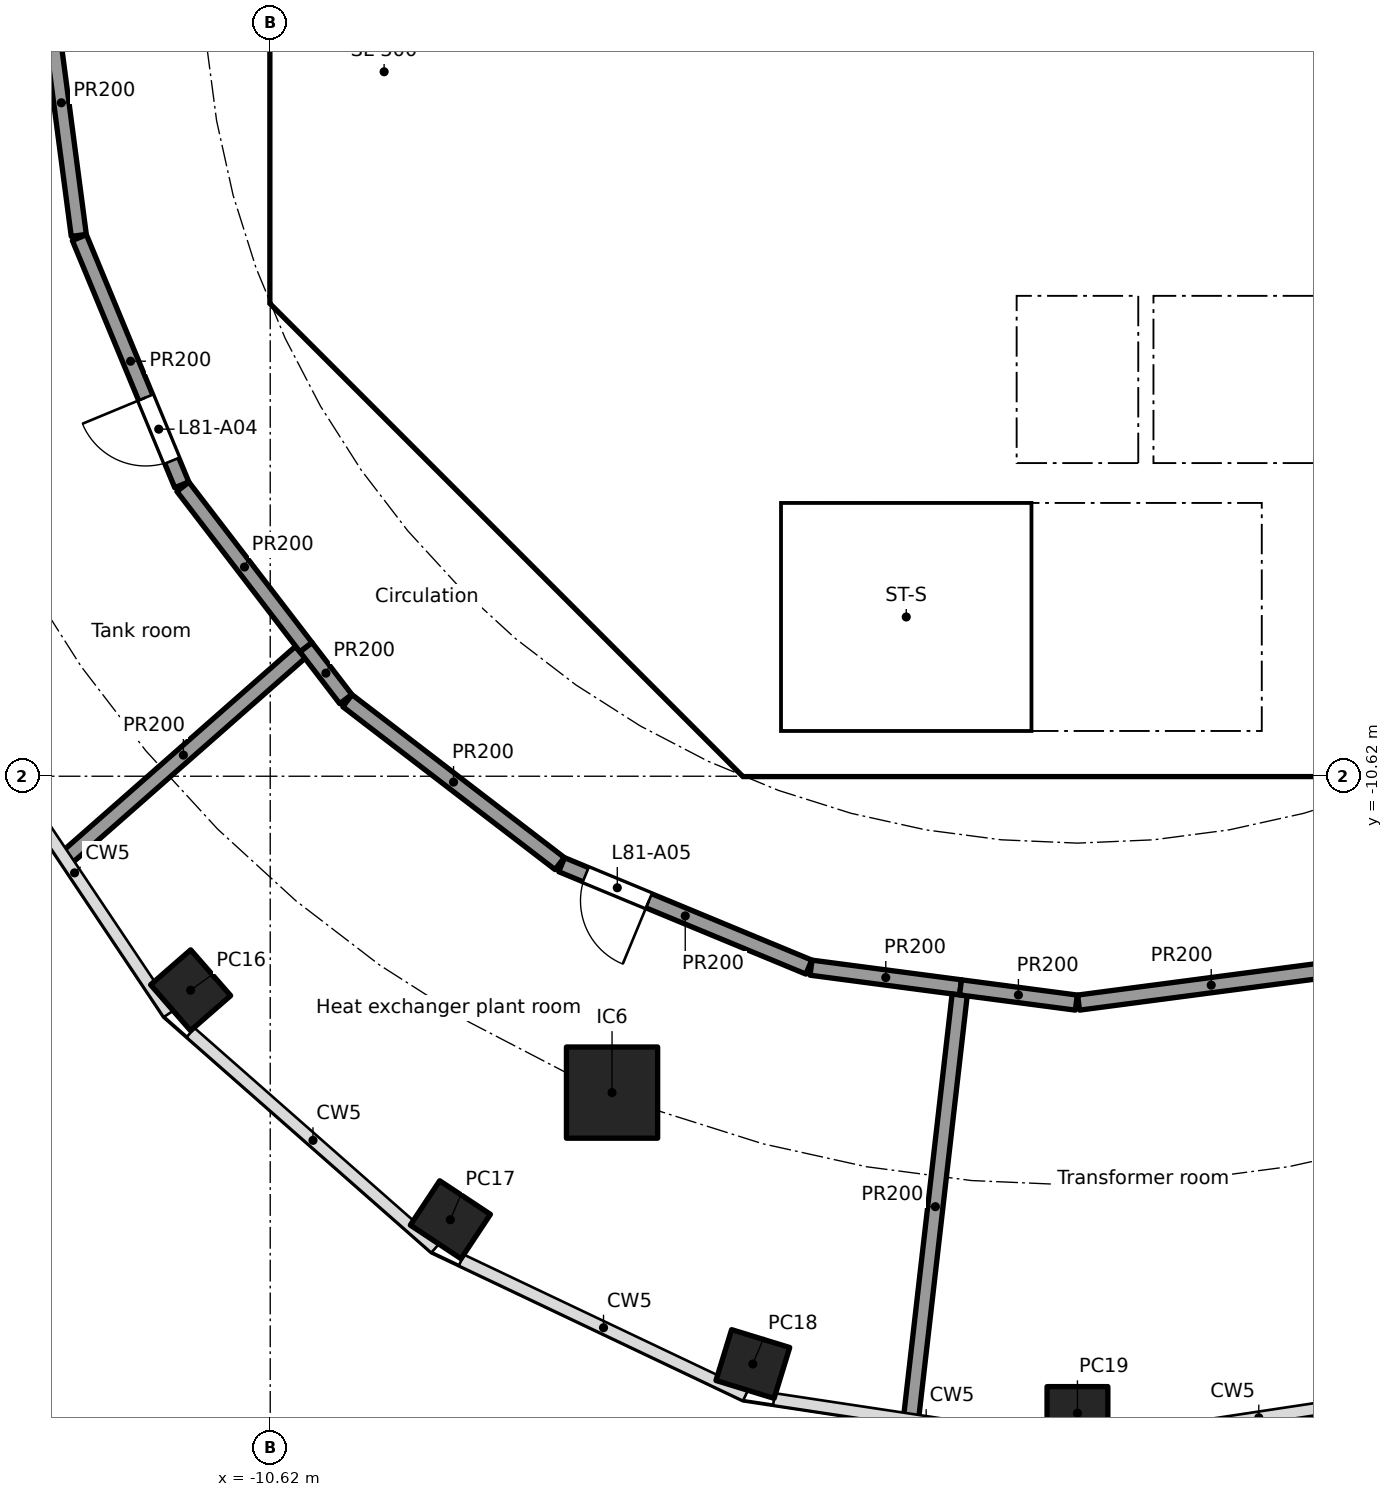
"""IFC4 building model, lengths in metres.
Left out: names, types, materials, properties, quantities, classifications, styles, units other than length and angle.
Written with IfcOpenShell. Run it as: python <this file> out.ifc"""

import sys

from ifc_helpers import new_model, si_unit, direction, frame, frame_2d, origin, origin_2d, place, context, subcontext, project, spatial, polyline, rectangle, hollow_rectangle, outline, extrude, element, fill, save


model = new_model("IFC4")
c1 = context("Model", 3, precision=1e-05, world=origin(), true_north=direction((0.0, 1.0)))
c2 = subcontext(c1, "Body", "Model", "MODEL_VIEW")
j1 = project(units=[si_unit("LENGTHUNIT", "METRE"), si_unit("PLANEANGLEUNIT", "RADIAN")], contexts=[c1])
p1 = place(None, origin())
s1 = spatial("IfcSite", under=j1, at=p1, CompositionType="ELEMENT")
p2 = place(p1, origin())
s2 = spatial("IfcBuilding", under=s1, at=p2, CompositionType="ELEMENT")
p3 = place(p2, frame((0.0, 0.0, 328.9)))
s3 = spatial("IfcBuildingStorey", under=s2, at=p3, CompositionType="ELEMENT", Elevation=328.9)
for number, where, z_axis, x_axis in (
    (1, (-11.667, -13.435, 0.0), (0.0, 0.0, 1.0), (0.657, -0.754, 0.0)),
    (2, (-8.25, -16.455, 0.0), (0.0, 0.0, 1.0), (0.834, -0.552, 0.0)),
    (3, (-4.271, -18.353, 0.0), (0.0, 0.0, 1.0), (0.956, -0.294, 0.0)),
    (4, (0.0, -19.0, 0.0), (0.0, 0.0, 1.0), (1.0, 0.0, 0.0)),
):
    element("IfcColumn", number, at=place(p3, frame(where, z_axis=z_axis, x_axis=x_axis)), inside=s3, PredefinedType="COLUMN", context=c2, shape_type="SweptSolid", body=[
        extrude(hollow_rectangle(XDim=0.8, YDim=0.7, WallThickness=0.025, at=origin_2d()), origin(), (0.0, 0.0, 1.0), 4.0),
    ])
p4 = place(p3, frame((-6.123, -14.782, 0.0), z_axis=(0.0, 0.0, 1.0), x_axis=(1.0, 0.0, 0.0)))
e5 = element("IfcColumn", 5, at=p4, inside=s3, PredefinedType="COLUMN", context=c2, shape_type="SweptSolid", body=[
    extrude(rectangle(XDim=1.2, YDim=1.2, at=origin_2d()), origin(), (0.0, 0.0, 1.0), 4.0),
])
p5 = place(p3, frame((-10.325, 3.801, 0.0), z_axis=(0.0, 0.0, 1.0), x_axis=(0.0, -1.0, 0.0)))
e6 = element("IfcWall", 6, at=p5, inside=s3, PredefinedType="SHEAR", context=c2, shape_type="SweptSolid", body=[
    extrude(rectangle(XDim=7.602, YDim=0.6, at=frame_2d((3.801, 0.0))), origin(), (0.0, 0.0, 1.0), 3.7),
])
p6 = place(p5, frame((0.651, 0.0, 0.0)))
e7 = element("IfcOpeningElement", 7, at=p6, cuts=e6, PredefinedType="OPENING", context=c2, shape_type="SweptSolid", body=[
    extrude(rectangle(XDim=1.5, YDim=2.1, at=frame_2d((0.75, 1.05))), frame((0.0, 0.31, 0.0), z_axis=(0.0, -1.0, 0.0), x_axis=(1.0, 0.0, 0.0)), (0.0, 0.0, 1.0), 0.62),
])
p7 = place(p5, frame((5.451, 0.0, 0.0)))
e8 = element("IfcOpeningElement", 8, at=p7, cuts=e6, PredefinedType="OPENING", context=c2, shape_type="SweptSolid", body=[
    extrude(rectangle(XDim=1.5, YDim=2.1, at=frame_2d((0.75, 1.05))), frame((0.0, 0.31, 0.0), z_axis=(0.0, -1.0, 0.0), x_axis=(1.0, 0.0, 0.0)), (0.0, 0.0, 1.0), 0.62),
])
p8 = place(p3, frame((-9.988, -4.613, 0.0), z_axis=(0.0, 0.0, 1.0), x_axis=(0.707106781187, -0.707106781187, 0.0)))
e9 = element("IfcWall", 9, at=p8, inside=s3, PredefinedType="SHEAR", context=c2, shape_type="SweptSolid", body=[
    extrude(rectangle(XDim=7.602, YDim=0.6, at=frame_2d((3.801, 0.0))), origin(), (0.0, 0.0, 1.0), 3.7),
])
p9 = place(p8, frame((6.151, 0.0, 0.0)))
e10 = element("IfcOpeningElement", 10, at=p9, cuts=e9, PredefinedType="OPENING", context=c2, shape_type="SweptSolid", body=[
    extrude(rectangle(XDim=1.1, YDim=2.1, at=frame_2d((0.55, 1.05))), frame((0.0, 0.31, 0.0), z_axis=(0.0, -1.0, 0.0), x_axis=(1.0, 0.0, 0.0)), (0.0, 0.0, 1.0), 0.62),
])
p10 = place(p3, frame((-5.8, -8.227, 0.0), z_axis=(0.0, 0.0, 1.0), x_axis=(0.0, 1.0, 0.0)))
e11 = element("IfcWall", 11, at=p10, inside=s3, PredefinedType="PARTITIONING", context=c2, shape_type="SweptSolid", body=[
    extrude(rectangle(XDim=3.927, YDim=0.15, at=frame_2d((1.963, 0.0))), origin(), (0.0, 0.0, 1.0), 3.7),
])
p11 = place(p10, frame((2.764, 0.0, 0.0)))
e12 = element("IfcOpeningElement", 12, at=p11, cuts=e11, PredefinedType="OPENING", context=c2, shape_type="SweptSolid", body=[
    extrude(rectangle(XDim=0.9, YDim=2.1, at=frame_2d((0.45, 1.05))), frame((0.0, 0.085, 0.0), z_axis=(0.0, -1.0, 0.0), x_axis=(1.0, 0.0, 0.0)), (0.0, 0.0, 1.0), 0.17),
])
p12 = place(p10, frame((0.688, 0.0, 0.0)))
e13 = element("IfcOpeningElement", 13, at=p12, cuts=e11, PredefinedType="OPENING", context=c2, shape_type="SweptSolid", body=[
    extrude(rectangle(XDim=0.9, YDim=2.1, at=frame_2d((0.45, 1.05))), frame((0.0, 0.085, 0.0), z_axis=(0.0, -1.0, 0.0), x_axis=(1.0, 0.0, 0.0)), (0.0, 0.0, 1.0), 0.17),
])
p13 = place(p3, frame((-4.0, -6.5, 0.0), z_axis=(0.0, 0.0, 1.0), x_axis=(0.0, 1.0, 0.0)))
e14 = element("IfcWall", 14, at=p13, inside=s3, PredefinedType="SOLIDWALL", context=c2, shape_type="SweptSolid", body=[
    extrude(rectangle(XDim=2.2, YDim=0.2, at=frame_2d((1.1, 0.0))), origin(), (0.0, 0.0, 1.0), 3.7),
])
p14 = place(p13, frame((0.65, 0.0, 0.0)))
e15 = element("IfcOpeningElement", 15, at=p14, cuts=e14, PredefinedType="OPENING", context=c2, shape_type="SweptSolid", body=[
    extrude(rectangle(XDim=0.9, YDim=2.1, at=frame_2d((0.45, 1.05))), frame((0.0, 0.11, 0.0), z_axis=(0.0, -1.0, 0.0), x_axis=(1.0, 0.0, 0.0)), (0.0, 0.0, 1.0), 0.22),
])
p15 = place(p3, frame((-6.7, -2.0, 0.0), z_axis=(0.0, 0.0, 1.0), x_axis=(1.0, 0.0, 0.0)))
e16 = element("IfcWall", 16, at=p15, inside=s3, PredefinedType="SOLIDWALL", context=c2, shape_type="SweptSolid", body=[
    extrude(rectangle(XDim=13.4, YDim=0.2, at=frame_2d((6.7, 0.0))), origin(), (0.0, 0.0, 1.0), 3.7),
])
p16 = place(p15, frame((1.85, 0.0, 0.0)))
e17 = element("IfcOpeningElement", 17, at=p16, cuts=e16, PredefinedType="OPENING", context=c2, shape_type="SweptSolid", body=[
    extrude(rectangle(XDim=0.9, YDim=2.1, at=frame_2d((0.45, 1.05))), frame((0.0, 0.11, 0.0), z_axis=(0.0, -1.0, 0.0), x_axis=(1.0, 0.0, 0.0)), (0.0, 0.0, 1.0), 0.22),
])
p17 = place(p15, frame((5.15, 0.0, 0.0)))
e18 = element("IfcOpeningElement", 18, at=p17, cuts=e16, PredefinedType="OPENING", context=c2, shape_type="SweptSolid", body=[
    extrude(rectangle(XDim=0.9, YDim=2.1, at=frame_2d((0.45, 1.05))), frame((0.0, 0.11, 0.0), z_axis=(0.0, -1.0, 0.0), x_axis=(1.0, 0.0, 0.0)), (0.0, 0.0, 1.0), 0.22),
])
p18 = place(p15, frame((7.35, 0.0, 0.0)))
e19 = element("IfcOpeningElement", 19, at=p18, cuts=e16, PredefinedType="OPENING", context=c2, shape_type="SweptSolid", body=[
    extrude(rectangle(XDim=0.9, YDim=2.1, at=frame_2d((0.45, 1.05))), frame((0.0, 0.11, 0.0), z_axis=(0.0, -1.0, 0.0), x_axis=(1.0, 0.0, 0.0)), (0.0, 0.0, 1.0), 0.22),
])
p19 = place(p15, frame((10.65, 0.0, 0.0)))
e20 = element("IfcOpeningElement", 20, at=p19, cuts=e16, PredefinedType="OPENING", context=c2, shape_type="SweptSolid", body=[
    extrude(rectangle(XDim=0.9, YDim=2.1, at=frame_2d((0.45, 1.05))), frame((0.0, 0.11, 0.0), z_axis=(0.0, -1.0, 0.0), x_axis=(1.0, 0.0, 0.0)), (0.0, 0.0, 1.0), 0.22),
])
p20 = place(p3, origin())
e21 = element("IfcWall", 21, at=p20, inside=s3, PredefinedType="SHEAR", context=c2, shape_type="SweptSolid", body=[
    extrude(outline(polyline([(-10.625, -3.801), (-10.025, -3.801), (-10.025, -4.152), (-9.776, -4.401), (-10.2, -4.825), (-10.625, -4.401), (-10.625, -3.801)])), origin(), (0.0, 0.0, 1.0), 3.7),
])
p21 = place(p3, origin())
e22 = element("IfcWall", 22, at=p21, inside=s3, PredefinedType="SHEAR", context=c2, shape_type="SweptSolid", body=[
    extrude(outline(polyline([(-4.152, -10.025), (4.152, -10.025), (4.401, -9.776), (4.825, -10.2), (4.401, -10.625), (-4.401, -10.625), (-4.825, -10.2), (-4.401, -9.776), (-4.152, -10.025)])), origin(), (0.0, 0.0, 1.0), 3.7),
])
p22 = place(p3, frame((-10.025, -4.0, 0.0), z_axis=(0.0, 0.0, 1.0), x_axis=(1.0, 0.0, 0.0)))
e23 = element("IfcWall", 23, at=p22, inside=s3, PredefinedType="PARTITIONING", context=c2, shape_type="SweptSolid", body=[
    extrude(rectangle(XDim=3.325, YDim=0.2, at=frame_2d((1.662, 0.0))), origin(), (0.0, 0.0, 1.0), 3.7),
])
p23 = place(p3, frame((-8.301, -5.8, 0.0), z_axis=(0.0, 0.0, 1.0), x_axis=(1.0, 0.0, 0.0)))
e24 = element("IfcWall", 24, at=p23, inside=s3, PredefinedType="PARTITIONING", context=c2, shape_type="SweptSolid", body=[
    extrude(rectangle(XDim=2.426, YDim=0.15, at=frame_2d((1.213, 0.0))), origin(), (0.0, 0.0, 1.0), 3.7),
])
for number, where, z_axis, x_axis in (
    (25, (-0.9, -6.5, 0.0), (0.0, 0.0, 1.0), (0.0, 1.0, 0.0)),
    (26, (0.9, -6.5, 0.0), (0.0, 0.0, 1.0), (0.0, 1.0, 0.0)),
):
    element("IfcWall", number, at=place(p3, frame(where, z_axis=z_axis, x_axis=x_axis)), inside=s3, PredefinedType="SOLIDWALL", context=c2, shape_type="SweptSolid", body=[
        extrude(rectangle(XDim=2.2, YDim=0.2, at=frame_2d((1.1, 0.0))), origin(), (0.0, 0.0, 1.0), 3.7),
    ])
p24 = place(p3, origin())
e27 = element("IfcWall", 27, at=p24, inside=s3, PredefinedType="SOLIDWALL", context=c2, shape_type="SweptSolid", body=[
    extrude(outline(polyline([(-6.7, -2.1), (-6.5, -2.1), (-6.5, -4.1), (-2.3, -4.1), (-2.3, -2.1), (-2.1, -2.1), (-2.1, -4.1), (-0.1, -4.1), (-0.1, -2.1), (0.1, -2.1), (0.1, -4.1), (2.1, -4.1), (2.1, -2.1), (2.3, -2.1), (2.3, -4.1), (6.5, -4.1), (6.5, -2.1), (6.7, -2.1), (6.7, -4.3), (-6.7, -4.3), (-6.7, -2.1)])), origin(), (0.0, 0.0, 1.0), 3.7),
])
p25 = place(p3, origin())
e28 = element("IfcWall", 28, at=p25, inside=s3, PredefinedType="SOLIDWALL", context=c2, shape_type="SweptSolid", body=[
    extrude(outline(polyline([(-3.9, -10.025), (-4.1, -10.025), (-4.1, -7.025), (-3.9, -7.025), (-3.9, -10.025)])), origin(), (0.0, 0.0, 1.0), 3.7),
])
p26 = place(p3, origin())
e29 = element("IfcWall", 29, at=p26, inside=s3, PredefinedType="SOLIDWALL", context=c2, shape_type="SweptSolid", body=[
    extrude(outline(polyline([(4.1, -7.025), (-4.1, -7.025), (-4.1, -6.5), (4.1, -6.5), (4.1, -7.025)])), origin(), (0.0, 0.0, 1.0), 3.7),
])
p27 = place(p3, frame((-13.139, -3.505, 0.0), z_axis=(0.0, 0.0, 1.0), x_axis=(-0.130468866457, 0.991452406768, 0.0)))
e30 = element("IfcWall", 30, at=p27, inside=s3, PredefinedType="PARTITIONING", context=c2, shape_type="SweptSolid", body=[
    extrude(rectangle(XDim=3.52, YDim=0.2, at=frame_2d((1.76, 0.0))), origin(), (0.0, 0.0, 1.0), 3.7),
])
p28 = place(p3, frame((-11.784, -6.786, 0.0), z_axis=(0.0, 0.0, 1.0), x_axis=(-0.382723413813, 0.92386297064, 0.0)))
e31 = element("IfcWall", 31, at=p28, inside=s3, PredefinedType="PARTITIONING", context=c2, shape_type="SweptSolid", body=[
    extrude(rectangle(XDim=3.52, YDim=0.2, at=frame_2d((1.76, 0.0))), origin(), (0.0, 0.0, 1.0), 3.7),
])
p29 = place(p28, frame((0.342, 0.0, 0.0)))
e32 = element("IfcOpeningElement", 32, at=p29, cuts=e31, PredefinedType="OPENING", context=c2, shape_type="SweptSolid", body=[
    extrude(rectangle(XDim=0.9, YDim=2.1, at=frame_2d((0.45, 1.05))), frame((0.0, 0.11, 0.0), z_axis=(0.0, -1.0, 0.0), x_axis=(1.0, 0.0, 0.0)), (0.0, 0.0, 1.0), 0.22),
])
p30 = place(p3, frame((-10.224, -8.989, 0.0), z_axis=(0.0, 0.0, 1.0), x_axis=(-0.750994766266, -0.660308156122, 0.0)))
e33 = element("IfcWall", 33, at=p30, inside=s3, PredefinedType="PARTITIONING", context=c2, shape_type="SweptSolid", body=[
    extrude(rectangle(XDim=4.097, YDim=0.2, at=frame_2d((2.049, 0.0))), origin(), (0.0, 0.0, 1.0), 3.7),
])
p31 = place(p3, frame((-10.149, -8.923, 0.0), z_axis=(0.0, 0.0, 1.0), x_axis=(-0.608699260048, 0.793401040343, 0.0)))
e34 = element("IfcWall", 34, at=p31, inside=s3, PredefinedType="PARTITIONING", context=c2, shape_type="SweptSolid", body=[
    extrude(rectangle(XDim=2.661, YDim=0.2, at=frame_2d((1.331, 0.0))), origin(), (0.0, 0.0, 1.0), 3.7),
])
p32 = place(p3, frame((-9.626, -9.605, 0.0), z_axis=(0.0, 0.0, 1.0), x_axis=(-0.608694005511, 0.793405071609, 0.0)))
e35 = element("IfcWall", 35, at=p32, inside=s3, PredefinedType="PARTITIONING", context=c2, shape_type="SweptSolid", body=[
    extrude(rectangle(XDim=0.859, YDim=0.2, at=frame_2d((0.43, 0.0))), origin(), (0.0, 0.0, 1.0), 3.7),
])
p33 = place(p3, frame((-6.812, -11.769, 0.0), z_axis=(0.0, 0.0, 1.0), x_axis=(-0.793402024283, 0.608697977542, 0.0)))
e36 = element("IfcWall", 36, at=p33, inside=s3, PredefinedType="PARTITIONING", context=c2, shape_type="SweptSolid", body=[
    extrude(rectangle(XDim=3.52, YDim=0.2, at=frame_2d((1.76, 0.0))), origin(), (0.0, 0.0, 1.0), 3.7),
])
p34 = place(p3, frame((-3.534, -13.131, 0.0), z_axis=(0.0, 0.0, 1.0), x_axis=(-0.92386297064, 0.382723413813, 0.0)))
e37 = element("IfcWall", 37, at=p34, inside=s3, PredefinedType="PARTITIONING", context=c2, shape_type="SweptSolid", body=[
    extrude(rectangle(XDim=3.52, YDim=0.2, at=frame_2d((1.76, 0.0))), origin(), (0.0, 0.0, 1.0), 3.7),
])
p35 = place(p34, frame((2.278, 0.0, 0.0)))
e38 = element("IfcOpeningElement", 38, at=p35, cuts=e37, PredefinedType="OPENING", context=c2, shape_type="SweptSolid", body=[
    extrude(rectangle(XDim=0.9, YDim=2.1, at=frame_2d((0.45, 1.05))), frame((0.0, 0.11, 0.0), z_axis=(0.0, -1.0, 0.0), x_axis=(1.0, 0.0, 0.0)), (0.0, 0.0, 1.0), 0.22),
])
p36 = place(p3, frame((-1.538, -13.397, 0.0), z_axis=(0.0, 0.0, 1.0), x_axis=(-0.991454295543, 0.130454512571, 0.0)))
e39 = element("IfcWall", 39, at=p36, inside=s3, PredefinedType="PARTITIONING", context=c2, shape_type="SweptSolid", body=[
    extrude(rectangle(XDim=1.984, YDim=0.2, at=frame_2d((0.992, 0.0))), origin(), (0.0, 0.0, 1.0), 3.7),
])
p37 = place(p3, frame((-1.55, -13.497, 0.0), z_axis=(0.0, 0.0, 1.0), x_axis=(-0.114057329834, -0.993474169524, 0.0)))
e40 = element("IfcWall", 40, at=p37, inside=s3, PredefinedType="PARTITIONING", context=c2, shape_type="SweptSolid", body=[
    extrude(rectangle(XDim=5.608, YDim=0.2, at=frame_2d((2.804, 0.0))), origin(), (0.0, 0.0, 1.0), 3.7),
])
p38 = place(p3, frame((-0.015, -13.598, 0.0), z_axis=(0.0, 0.0, 1.0), x_axis=(-0.991449967232, 0.13048740351, 0.0)))
e41 = element("IfcWall", 41, at=p38, inside=s3, PredefinedType="PARTITIONING", context=c2, shape_type="SweptSolid", body=[
    extrude(rectangle(XDim=1.536, YDim=0.2, at=frame_2d((0.768, 0.0))), origin(), (0.0, 0.0, 1.0), 3.7),
])
p39 = place(p3, frame((3.505, -13.139, 0.0), z_axis=(0.0, 0.0, 1.0), x_axis=(-0.991452406768, -0.130468866457, 0.0)))
e42 = element("IfcWall", 42, at=p39, inside=s3, PredefinedType="PARTITIONING", context=c2, shape_type="SweptSolid", body=[
    extrude(rectangle(XDim=3.52, YDim=0.2, at=frame_2d((1.76, 0.0))), origin(), (0.0, 0.0, 1.0), 3.7),
])
p40 = place(p11, origin())
e43 = element("IfcDoor", 43, at=p40, inside=s3, OperationType="SINGLE_SWING_RIGHT", PredefinedType="DOOR", context=c2, shape_type="SweptSolid", body=[
    extrude(rectangle(XDim=0.9, YDim=2.1, at=frame_2d((0.45, 1.05))), frame((0.0, 0.025, 0.0), z_axis=(0.0, -1.0, 0.0), x_axis=(1.0, 0.0, 0.0)), (0.0, 0.0, 1.0), 0.05),
])
fill(e12, e43)
p41 = place(p12, origin())
e44 = element("IfcDoor", 44, at=p41, inside=s3, OperationType="SINGLE_SWING_RIGHT", PredefinedType="DOOR", context=c2, shape_type="SweptSolid", body=[
    extrude(rectangle(XDim=0.9, YDim=2.1, at=frame_2d((0.45, 1.05))), frame((0.0, 0.025, 0.0), z_axis=(0.0, -1.0, 0.0), x_axis=(1.0, 0.0, 0.0)), (0.0, 0.0, 1.0), 0.05),
])
fill(e13, e44)
p42 = place(p14, frame((0.9, 0.0, 0.0), x_axis=(-1.0, 0.0, 0.0)))
e45 = element("IfcDoor", 45, at=p42, inside=s3, OperationType="SINGLE_SWING_RIGHT", PredefinedType="DOOR", context=c2, shape_type="SweptSolid", body=[
    extrude(rectangle(XDim=0.9, YDim=2.1, at=frame_2d((0.45, 1.05))), frame((0.0, 0.025, 0.0), z_axis=(0.0, -1.0, 0.0), x_axis=(1.0, 0.0, 0.0)), (0.0, 0.0, 1.0), 0.05),
])
fill(e15, e45)
p43 = place(p16, frame((0.9, 0.0, 0.0), x_axis=(-1.0, 0.0, 0.0)))
e46 = element("IfcDoor", 46, at=p43, inside=s3, OperationType="SINGLE_SWING_RIGHT", PredefinedType="DOOR", context=c2, shape_type="SweptSolid", body=[
    extrude(rectangle(XDim=0.9, YDim=2.1, at=frame_2d((0.45, 1.05))), frame((0.0, 0.025, 0.0), z_axis=(0.0, -1.0, 0.0), x_axis=(1.0, 0.0, 0.0)), (0.0, 0.0, 1.0), 0.05),
])
fill(e17, e46)
p44 = place(p17, frame((0.9, 0.0, 0.0), x_axis=(-1.0, 0.0, 0.0)))
e47 = element("IfcDoor", 47, at=p44, inside=s3, OperationType="SINGLE_SWING_RIGHT", PredefinedType="DOOR", context=c2, shape_type="SweptSolid", body=[
    extrude(rectangle(XDim=0.9, YDim=2.1, at=frame_2d((0.45, 1.05))), frame((0.0, 0.025, 0.0), z_axis=(0.0, -1.0, 0.0), x_axis=(1.0, 0.0, 0.0)), (0.0, 0.0, 1.0), 0.05),
])
fill(e18, e47)
p45 = place(p18, frame((0.9, 0.0, 0.0), x_axis=(-1.0, 0.0, 0.0)))
e48 = element("IfcDoor", 48, at=p45, inside=s3, OperationType="SINGLE_SWING_RIGHT", PredefinedType="DOOR", context=c2, shape_type="SweptSolid", body=[
    extrude(rectangle(XDim=0.9, YDim=2.1, at=frame_2d((0.45, 1.05))), frame((0.0, 0.025, 0.0), z_axis=(0.0, -1.0, 0.0), x_axis=(1.0, 0.0, 0.0)), (0.0, 0.0, 1.0), 0.05),
])
fill(e19, e48)
p46 = place(p7, origin())
e49 = element("IfcDoor", 49, at=p46, inside=s3, OperationType="DOUBLE_DOOR_SINGLE_SWING", PredefinedType="DOOR", context=c2, shape_type="SweptSolid", body=[
    extrude(rectangle(XDim=1.5, YDim=2.1, at=frame_2d((0.75, 1.05))), frame((0.0, 0.025, 0.0), z_axis=(0.0, -1.0, 0.0), x_axis=(1.0, 0.0, 0.0)), (0.0, 0.0, 1.0), 0.05),
])
fill(e8, e49)
p47 = place(p9, origin())
e50 = element("IfcDoor", 50, at=p47, inside=s3, OperationType="SINGLE_SWING_LEFT", PredefinedType="DOOR", context=c2, shape_type="SweptSolid", body=[
    extrude(rectangle(XDim=1.1, YDim=2.1, at=frame_2d((0.55, 1.05))), frame((0.0, 0.025, 0.0), z_axis=(0.0, -1.0, 0.0), x_axis=(1.0, 0.0, 0.0)), (0.0, 0.0, 1.0), 0.05),
])
fill(e10, e50)
p48 = place(p29, origin())
e51 = element("IfcDoor", 51, at=p48, inside=s3, OperationType="SINGLE_SWING_RIGHT", PredefinedType="DOOR", context=c2, shape_type="SweptSolid", body=[
    extrude(rectangle(XDim=0.9, YDim=2.1, at=frame_2d((0.45, 1.05))), frame((0.0, 0.025, 0.0), z_axis=(0.0, -1.0, 0.0), x_axis=(1.0, 0.0, 0.0)), (0.0, 0.0, 1.0), 0.05),
])
fill(e32, e51)
p49 = place(p35, origin())
e52 = element("IfcDoor", 52, at=p49, inside=s3, OperationType="SINGLE_SWING_LEFT", PredefinedType="DOOR", context=c2, shape_type="SweptSolid", body=[
    extrude(rectangle(XDim=0.9, YDim=2.1, at=frame_2d((0.45, 1.05))), frame((0.0, 0.025, 0.0), z_axis=(0.0, -1.0, 0.0), x_axis=(1.0, 0.0, 0.0)), (0.0, 0.0, 1.0), 0.05),
])
fill(e38, e52)
save(model, sys.argv[1])
